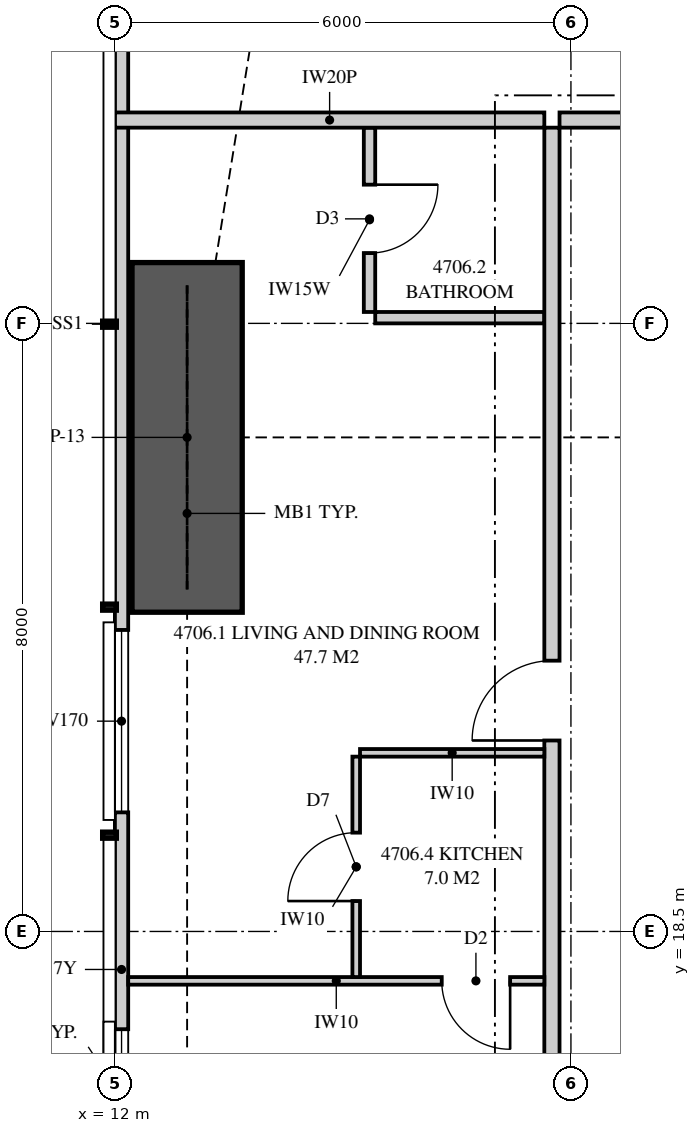
"""IFC4 building model, lengths in metres.
Left out: names, types, materials, properties, quantities, classifications, styles, units other than length and angle.
Written with IfcOpenShell. Run it as: python <this file> out.ifc"""

import sys

from ifc_helpers import new_model, si_unit, direction, frame, frame_2d, origin, place, context, subcontext, project, spatial, polyline, rectangle, outline, extrude, element, fill, save


model = new_model("IFC4")
c1 = context("Model", 3, precision=1e-05, world=origin(), true_north=direction((0.0, 1.0)))
c2 = subcontext(c1, "Body", "Model", "MODEL_VIEW")
j1 = project(units=[si_unit("LENGTHUNIT", "METRE"), si_unit("PLANEANGLEUNIT", "RADIAN")], contexts=[c1])
p1 = place(None, origin())
s1 = spatial("IfcSite", under=j1, at=p1, CompositionType="ELEMENT")
p2 = place(p1, origin())
s2 = spatial("IfcBuilding", under=s1, at=p2, CompositionType="ELEMENT")
p3 = place(p2, frame((0.0, 0.0, 174.45)))
s3 = spatial("IfcBuildingStorey", under=s2, at=p3, CompositionType="ELEMENT", Elevation=174.45)
p4 = place(p3, frame((12.087, 32.949, 0.0), z_axis=(0.0, 0.0, 1.0), x_axis=(0.0, -1.0, 0.0)))
e1 = element("IfcWall", 1, at=p4, inside=s3, PredefinedType="SOLIDWALL", context=c2, shape_type="SweptSolid", body=[
    extrude(outline(polyline([(0.0, 0.0), (29.897, 0.0), (29.897, 3.11), (20.191, 3.11), (20.191, 2.15), (20.051, 2.15), (20.051, 3.11), (19.949, 3.11), (19.949, 2.15), (7.949, 2.15), (7.949, 3.11), (7.823, 3.11), (7.823, 2.15), (7.73, 2.15), (7.73, 3.11), (0.0, 3.11), (0.0, 0.0)])), frame((0.0, 0.087, 0.0), z_axis=(0.0, -1.0, 0.0), x_axis=(1.0, 0.0, 0.0)), (0.0, 0.0, 1.0), 0.175),
])
p5 = place(p4, frame((1.237, 0.0, 0.4)))
e2 = element("IfcOpeningElement", 2, at=p5, cuts=e1, PredefinedType="OPENING", context=c2, shape_type="SweptSolid", body=[
    extrude(rectangle(XDim=1.2, YDim=1.7, at=frame_2d((0.6, 0.85))), frame((0.0, 0.097, 0.0), z_axis=(0.0, -1.0, 0.0), x_axis=(1.0, 0.0, 0.0)), (0.0, 0.0, 1.0), 0.195),
])
p6 = place(p4, frame((10.482, 0.0, 0.4)))
e3 = element("IfcOpeningElement", 3, at=p6, cuts=e1, PredefinedType="OPENING", context=c2, shape_type="SweptSolid", body=[
    extrude(rectangle(XDim=2.4, YDim=1.7, at=frame_2d((1.2, 0.85))), frame((0.0, 0.097, 0.0), z_axis=(0.0, -1.0, 0.0), x_axis=(1.0, 0.0, 0.0)), (0.0, 0.0, 1.0), 0.195),
])
p7 = place(p4, frame((15.735, 0.0, 0.4)))
e4 = element("IfcOpeningElement", 4, at=p7, cuts=e1, PredefinedType="OPENING", context=c2, shape_type="SweptSolid", body=[
    extrude(rectangle(XDim=1.8, YDim=1.7, at=frame_2d((0.9, 0.85))), frame((0.0, 0.097, 0.0), z_axis=(0.0, -1.0, 0.0), x_axis=(1.0, 0.0, 0.0)), (0.0, 0.0, 1.0), 0.195),
])
p8 = place(p4, frame((22.624, 0.0, 0.0)))
e5 = element("IfcOpeningElement", 5, at=p8, cuts=e1, PredefinedType="OPENING", context=c2, shape_type="SweptSolid", body=[
    extrude(rectangle(XDim=1.8, YDim=2.1, at=frame_2d((0.9, 1.05))), frame((0.0, 0.097, 0.0), z_axis=(0.0, -1.0, 0.0), x_axis=(1.0, 0.0, 0.0)), (0.0, 0.0, 1.0), 0.195),
])
p9 = place(p4, frame((26.301, 0.0, 0.4)))
e6 = element("IfcOpeningElement", 6, at=p9, cuts=e1, PredefinedType="OPENING", context=c2, shape_type="SweptSolid", body=[
    extrude(rectangle(XDim=1.8, YDim=1.7, at=frame_2d((0.9, 0.85))), frame((0.0, 0.097, 0.0), z_axis=(0.0, -1.0, 0.0), x_axis=(1.0, 0.0, 0.0)), (0.0, 0.0, 1.0), 0.195),
])
p10 = place(p3, frame((17.85, 29.175, 0.0), z_axis=(0.0, 0.0, 1.0), x_axis=(1.0, 0.0, 0.0)))
e7 = element("IfcWall", 7, at=p10, inside=s3, PredefinedType="PARTITIONING", context=c2, shape_type="SweptSolid", body=[
    extrude(outline(polyline([(0.0, 0.0), (6.0, 0.0), (6.0, 3.11), (4.737, 3.11), (4.737, 2.541), (4.062, 2.541), (4.062, 3.11), (0.0, 3.11), (0.0, 0.0)])), frame((0.0, 0.1, 0.0), z_axis=(0.0, -1.0, 0.0), x_axis=(1.0, 0.0, 0.0)), (0.0, 0.0, 1.0), 0.2),
])
p11 = place(p10, frame((2.1, 0.0, 0.0)))
e8 = element("IfcOpeningElement", 8, at=p11, cuts=e7, PredefinedType="OPENING", context=c2, shape_type="SweptSolid", body=[
    extrude(rectangle(XDim=1.8, YDim=2.1, at=frame_2d((0.9, 1.05))), frame((0.0, 0.11, 0.0), z_axis=(0.0, -1.0, 0.0), x_axis=(1.0, 0.0, 0.0)), (0.0, 0.0, 1.0), 0.22),
])
p12 = place(p3, frame((12.0, 29.175, 0.0), z_axis=(0.0, 0.0, 1.0), x_axis=(1.0, 0.0, 0.0)))
e9 = element("IfcWall", 9, at=p12, inside=s3, PredefinedType="PARTITIONING", context=c2, shape_type="SweptSolid", body=[
    extrude(outline(polyline([(0.0, 0.0), (5.65, 0.0), (5.65, 3.11), (2.547, 3.11), (2.547, 2.15), (0.703, 2.15), (0.703, 3.11), (0.0, 3.11), (0.0, 0.0)])), frame((0.0, 0.1, 0.0), z_axis=(0.0, -1.0, 0.0), x_axis=(1.0, 0.0, 0.0)), (0.0, 0.0, 1.0), 0.2),
])
p13 = place(p3, frame((17.75, 13.95, 0.0), z_axis=(0.0, 0.0, 1.0), x_axis=(0.0, 1.0, 0.0)))
e10 = element("IfcWall", 10, at=p13, inside=s3, PredefinedType="PARTITIONING", context=c2, shape_type="SweptSolid", body=[
    extrude(outline(polyline([(0.0, 0.0), (15.125, 0.0), (15.125, 3.11), (11.387, 3.11), (11.387, 2.541), (10.713, 2.541), (10.713, 3.11), (0.0, 3.11), (0.0, 0.0)])), frame((0.0, 0.1, 0.0), z_axis=(0.0, -1.0, 0.0), x_axis=(1.0, 0.0, 0.0)), (0.0, 0.0, 1.0), 0.2),
])
p14 = place(p13, frame((7.062, 0.0, 0.0)))
e11 = element("IfcOpeningElement", 11, at=p14, cuts=e10, PredefinedType="OPENING", context=c2, shape_type="SweptSolid", body=[
    extrude(rectangle(XDim=1.05, YDim=2.2, at=frame_2d((0.525, 1.1))), frame((0.0, 0.11, 0.0), z_axis=(0.0, -1.0, 0.0), x_axis=(1.0, 0.0, 0.0)), (0.0, 0.0, 1.0), 0.22),
])
p15 = place(p3, frame((15.35, 26.65, 0.0), z_axis=(0.0, 0.0, 1.0), x_axis=(0.0, 1.0, 0.0)))
e12 = element("IfcWall", 12, at=p15, inside=s3, PredefinedType="PLUMBINGWALL", context=c2, shape_type="SweptSolid", body=[
    extrude(rectangle(XDim=2.425, YDim=0.15, at=frame_2d((1.212, 0.0))), origin(), (0.0, 0.0, 1.0), 3.11),
])
p16 = place(p15, frame((0.775, 0.0, 0.0)))
e13 = element("IfcOpeningElement", 13, at=p16, cuts=e12, PredefinedType="OPENING", context=c2, shape_type="SweptSolid", body=[
    extrude(rectangle(XDim=0.9, YDim=2.1, at=frame_2d((0.45, 1.05))), frame((0.0, 0.085, 0.0), z_axis=(0.0, -1.0, 0.0), x_axis=(1.0, 0.0, 0.0)), (0.0, 0.0, 1.0), 0.17),
])
p17 = place(p3, frame((15.425, 26.575, 0.0), z_axis=(0.0, 0.0, 1.0), x_axis=(1.0, 0.0, 0.0)))
e14 = element("IfcWall", 14, at=p17, inside=s3, PredefinedType="PLUMBINGWALL", context=c2, shape_type="SweptSolid", body=[
    extrude(rectangle(XDim=2.225, YDim=0.15, at=frame_2d((1.112, 0.0))), origin(), (0.0, 0.0, 1.0), 3.11),
])
p18 = place(p3, frame((12.175, 17.85, 0.0), z_axis=(0.0, 0.0, 1.0), x_axis=(1.0, 0.0, 0.0)))
e15 = element("IfcWall", 15, at=p18, inside=s3, PredefinedType="PARTITIONING", context=c2, shape_type="SweptSolid", body=[
    extrude(outline(polyline([(0.0, 0.0), (5.475, 0.0), (5.475, 3.11), (1.635, 3.11), (1.635, 2.15), (0.0, 2.15), (0.0, 3.11), (0.0, 0.0)])), frame((0.0, 0.05, 0.0), z_axis=(0.0, -1.0, 0.0), x_axis=(1.0, 0.0, 0.0)), (0.0, 0.0, 1.0), 0.1),
])
p19 = place(p18, frame((4.125, 0.0, 0.0)))
e16 = element("IfcOpeningElement", 16, at=p19, cuts=e15, PredefinedType="OPENING", context=c2, shape_type="SweptSolid", body=[
    extrude(rectangle(XDim=0.9, YDim=2.1, at=frame_2d((0.45, 1.05))), frame((0.0, 0.06, 0.0), z_axis=(0.0, -1.0, 0.0), x_axis=(1.0, 0.0, 0.0)), (0.0, 0.0, 1.0), 0.12),
])
p20 = place(p3, frame((15.175, 17.9, 0.0), z_axis=(0.0, 0.0, 1.0), x_axis=(0.0, 1.0, 0.0)))
e17 = element("IfcWall", 17, at=p20, inside=s3, PredefinedType="PARTITIONING", context=c2, shape_type="SweptSolid", body=[
    extrude(rectangle(XDim=2.9, YDim=0.1, at=frame_2d((1.45, 0.0))), origin(), (0.0, 0.0, 1.0), 3.11),
])
p21 = place(p20, frame((1.0, 0.0, 0.0)))
e18 = element("IfcOpeningElement", 18, at=p21, cuts=e17, PredefinedType="OPENING", context=c2, shape_type="SweptSolid", body=[
    extrude(rectangle(XDim=0.9, YDim=2.1, at=frame_2d((0.45, 1.05))), frame((0.0, 0.06, 0.0), z_axis=(0.0, -1.0, 0.0), x_axis=(1.0, 0.0, 0.0)), (0.0, 0.0, 1.0), 0.12),
])
p22 = place(p3, frame((15.225, 20.85, 0.0), z_axis=(0.0, 0.0, 1.0), x_axis=(1.0, 0.0, 0.0)))
e19 = element("IfcWall", 19, at=p22, inside=s3, PredefinedType="PARTITIONING", context=c2, shape_type="SweptSolid", body=[
    extrude(rectangle(XDim=2.425, YDim=0.1, at=frame_2d((1.212, 0.0))), origin(), (0.0, 0.0, 1.0), 3.11),
])
p23 = place(p3, frame((12.95, 22.7, 0.0), z_axis=(0.0, 0.0, 1.0), x_axis=(0.0, 1.0, 0.0)))
e20 = element("IfcWall", 20, at=p23, inside=s3, PredefinedType="SHEAR", context=c2, shape_type="SweptSolid", body=[
    extrude(rectangle(XDim=4.6, YDim=1.45, at=frame_2d((2.3, 0.0))), origin(), (0.0, 0.0, 1.0), 3.35),
])
p24 = place(p6, origin())
e21 = element("IfcWindow", 21, at=p24, inside=s3, PartitioningType="SINGLE_PANEL", PredefinedType="WINDOW", context=c2, shape_type="SweptSolid", body=[
    extrude(rectangle(XDim=2.4, YDim=1.7, at=frame_2d((1.2, 0.85))), frame((0.0, 0.03, 0.0), z_axis=(0.0, -1.0, 0.0), x_axis=(1.0, 0.0, 0.0)), (0.0, 0.0, 1.0), 0.06),
])
fill(e3, e21)
p25 = place(p7, origin())
e22 = element("IfcWindow", 22, at=p25, inside=s3, PartitioningType="SINGLE_PANEL", PredefinedType="WINDOW", context=c2, shape_type="SweptSolid", body=[
    extrude(rectangle(XDim=1.8, YDim=1.7, at=frame_2d((0.9, 0.85))), frame((0.0, 0.03, 0.0), z_axis=(0.0, -1.0, 0.0), x_axis=(1.0, 0.0, 0.0)), (0.0, 0.0, 1.0), 0.06),
])
fill(e4, e22)
p26 = place(p14, origin())
e23 = element("IfcDoor", 23, at=p26, inside=s3, OperationType="SINGLE_SWING_LEFT", PredefinedType="DOOR", context=c2, shape_type="SweptSolid", body=[
    extrude(rectangle(XDim=1.05, YDim=2.2, at=frame_2d((0.525, 1.1))), frame((0.0, 0.025, 0.0), z_axis=(0.0, -1.0, 0.0), x_axis=(1.0, 0.0, 0.0)), (0.0, 0.0, 1.0), 0.05),
])
fill(e11, e23)
p27 = place(p16, frame((0.9, 0.0, 0.0), z_axis=(0.0, 0.0, 1.0), x_axis=(-1.0, 0.0, 0.0)))
e24 = element("IfcDoor", 24, at=p27, inside=s3, OperationType="SINGLE_SWING_LEFT", PredefinedType="DOOR", context=c2, shape_type="SweptSolid", body=[
    extrude(rectangle(XDim=0.9, YDim=2.1, at=frame_2d((0.45, 1.05))), frame((0.0, 0.025, 0.0), z_axis=(0.0, -1.0, 0.0), x_axis=(1.0, 0.0, 0.0)), (0.0, 0.0, 1.0), 0.05),
])
fill(e13, e24)
p28 = place(p19, frame((0.9, 0.0, 0.0), z_axis=(0.0, 0.0, 1.0), x_axis=(-1.0, 0.0, 0.0)))
e25 = element("IfcDoor", 25, at=p28, inside=s3, OperationType="SINGLE_SWING_LEFT", PredefinedType="DOOR", context=c2, shape_type="SweptSolid", body=[
    extrude(rectangle(XDim=0.9, YDim=2.1, at=frame_2d((0.45, 1.05))), frame((0.0, 0.025, 0.0), z_axis=(0.0, -1.0, 0.0), x_axis=(1.0, 0.0, 0.0)), (0.0, 0.0, 1.0), 0.05),
])
fill(e16, e25)
p29 = place(p21, origin())
e26 = element("IfcDoor", 26, at=p29, inside=s3, OperationType="SINGLE_SWING_LEFT", PredefinedType="DOOR", context=c2, shape_type="SweptSolid", body=[
    extrude(rectangle(XDim=0.9, YDim=2.1, at=frame_2d((0.45, 1.05))), frame((0.0, 0.025, 0.0), z_axis=(0.0, -1.0, 0.0), x_axis=(1.0, 0.0, 0.0)), (0.0, 0.0, 1.0), 0.05),
])
fill(e18, e26)
save(model, sys.argv[1])
